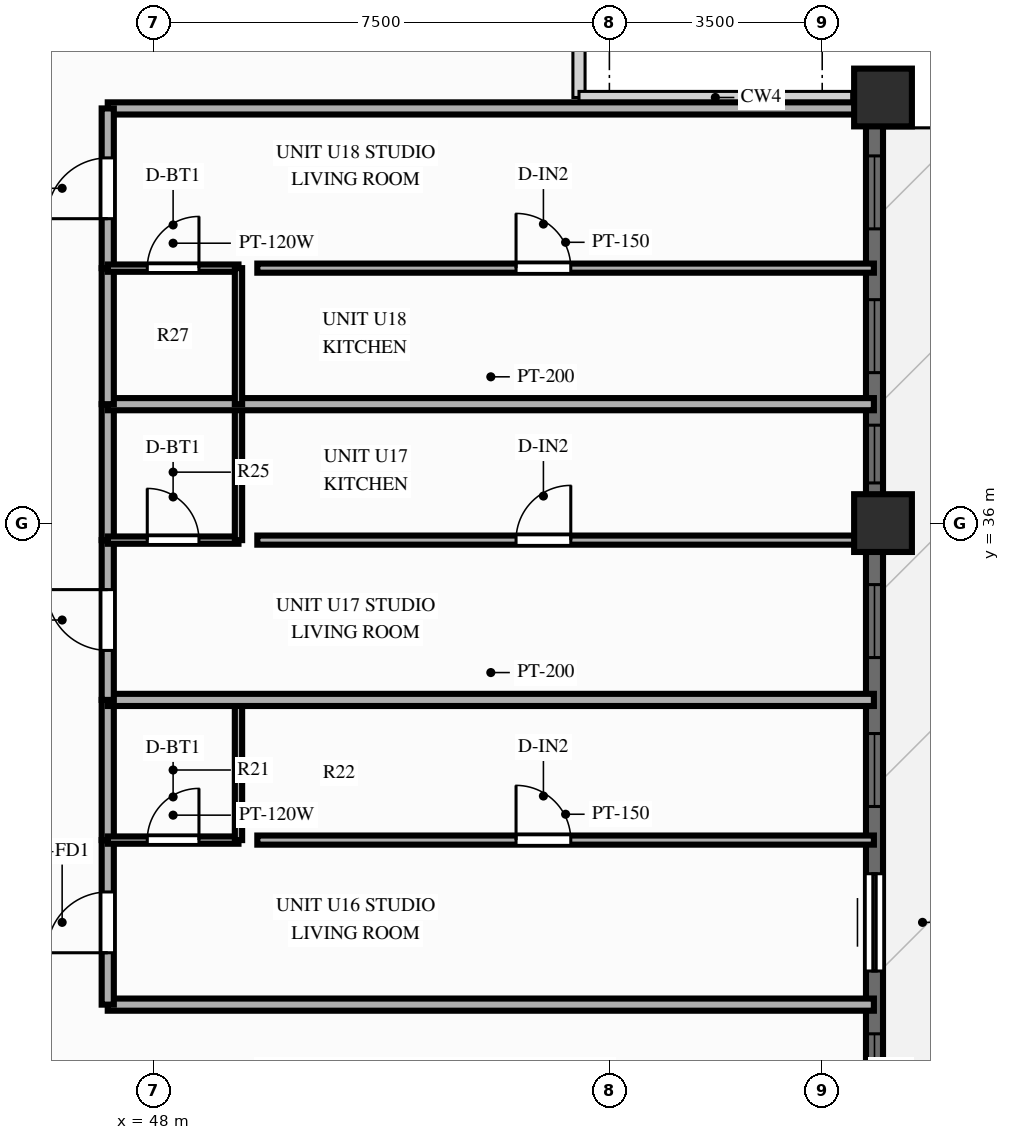
"""IFC4 building model, lengths in metres.
Left out: names, types, materials, properties, quantities, classifications, styles, units other than length and angle.
Written with IfcOpenShell. Run it as: python <this file> out.ifc"""

import sys

from ifc_helpers import new_model, si_unit, direction, frame, frame_2d, origin, origin_2d, place, context, subcontext, project, spatial, rectangle, extrude, source, transform, mapped, element, fill, save


model = new_model("IFC4")
c1 = context("Model", 3, precision=1e-05, world=origin(), true_north=direction((0.0, 1.0)))
c2 = subcontext(c1, "Body", "Model", "MODEL_VIEW")
j1 = project(units=[si_unit("LENGTHUNIT", "METRE"), si_unit("PLANEANGLEUNIT", "RADIAN")], contexts=[c1])
p1 = place(None, origin())
s1 = spatial("IfcSite", under=j1, at=p1, CompositionType="ELEMENT")
p2 = place(p1, origin())
s2 = spatial("IfcBuilding", under=s1, at=p2, CompositionType="ELEMENT")
p3 = place(p2, frame((0.0, 0.0, 166.0)))
s3 = spatial("IfcBuildingStorey", under=s2, at=p3, CompositionType="ELEMENT", Elevation=166.0)
m1 = source(origin(), c2, "Body", "SweptSolid", [
    extrude(rectangle(XDim=0.95, YDim=0.95, at=origin_2d()), origin(), (0.0, 0.0, 1.0), 3.0),
])
for number, where, z_axis, x_axis in (
    (1, (60.0, 36.0, 0.0), (0.0, 0.0, 1.0), (1.0, 0.0, 0.0)),
    (2, (60.0, 43.0, 0.0), (0.0, 0.0, 1.0), (1.0, 0.0, 0.0)),
):
    element("IfcColumn", number, at=place(p3, frame(where, z_axis=z_axis, x_axis=x_axis)), inside=s3, PredefinedType="COLUMN", context=c2, shape_type="MappedRepresentation", body=[
        mapped(m1, transform((0.0, 0.0, 0.0), scale=1.0)),
    ])
p4 = place(p3, frame((59.86, 11.0, 0.0), z_axis=(0.0, 0.0, 1.0), x_axis=(0.0, 1.0, 0.0)))
e3 = element("IfcWall", 3, at=p4, inside=s3, PredefinedType="SOLIDWALL", context=c2, shape_type="SweptSolid", body=[
    extrude(rectangle(XDim=32.0, YDim=0.28, at=frame_2d((16.0, 0.0))), origin(), (0.0, 0.0, 1.0), 2.28),
])
p5 = place(p4, frame((1.04, 0.0, 0.25)))
e4 = element("IfcOpeningElement", 4, at=p5, cuts=e3, PredefinedType="OPENING", context=c2, shape_type="SweptSolid", body=[
    extrude(rectangle(XDim=1.2, YDim=1.5, at=frame_2d((0.6, 0.75))), frame((0.0, 0.152, 0.0), z_axis=(0.0, -1.0, 0.0), x_axis=(1.0, 0.0, 0.0)), (0.0, 0.0, 1.0), 0.304),
])
p6 = place(p4, frame((3.552, 0.0, 0.25)))
e5 = element("IfcOpeningElement", 5, at=p6, cuts=e3, PredefinedType="OPENING", context=c2, shape_type="SweptSolid", body=[
    extrude(rectangle(XDim=1.2, YDim=1.5, at=frame_2d((0.6, 0.75))), frame((0.0, 0.152, 0.0), z_axis=(0.0, -1.0, 0.0), x_axis=(1.0, 0.0, 0.0)), (0.0, 0.0, 1.0), 0.304),
])
p7 = place(p4, frame((5.662, 0.0, 0.25)))
e6 = element("IfcOpeningElement", 6, at=p7, cuts=e3, PredefinedType="OPENING", context=c2, shape_type="SweptSolid", body=[
    extrude(rectangle(XDim=0.7, YDim=1.5, at=frame_2d((0.35, 0.75))), frame((0.0, 0.152, 0.0), z_axis=(0.0, -1.0, 0.0), x_axis=(1.0, 0.0, 0.0)), (0.0, 0.0, 1.0), 0.304),
])
p8 = place(p4, frame((8.29, 0.0, 0.25)))
e7 = element("IfcOpeningElement", 7, at=p8, cuts=e3, PredefinedType="OPENING", context=c2, shape_type="SweptSolid", body=[
    extrude(rectangle(XDim=1.2, YDim=1.5, at=frame_2d((0.6, 0.75))), frame((0.0, 0.152, 0.0), z_axis=(0.0, -1.0, 0.0), x_axis=(1.0, 0.0, 0.0)), (0.0, 0.0, 1.0), 0.304),
])
p9 = place(p4, frame((10.688, 0.0, 0.25)))
e8 = element("IfcOpeningElement", 8, at=p9, cuts=e3, PredefinedType="OPENING", context=c2, shape_type="SweptSolid", body=[
    extrude(rectangle(XDim=1.2, YDim=1.5, at=frame_2d((0.6, 0.75))), frame((0.0, 0.152, 0.0), z_axis=(0.0, -1.0, 0.0), x_axis=(1.0, 0.0, 0.0)), (0.0, 0.0, 1.0), 0.304),
])
p10 = place(p4, frame((13.046, 0.0, 0.25)))
e9 = element("IfcOpeningElement", 9, at=p10, cuts=e3, PredefinedType="OPENING", context=c2, shape_type="SweptSolid", body=[
    extrude(rectangle(XDim=1.2, YDim=1.5, at=frame_2d((0.6, 0.75))), frame((0.0, 0.152, 0.0), z_axis=(0.0, -1.0, 0.0), x_axis=(1.0, 0.0, 0.0)), (0.0, 0.0, 1.0), 0.304),
])
p11 = place(p4, frame((15.4, 0.0, 0.25)))
e10 = element("IfcOpeningElement", 10, at=p11, cuts=e3, PredefinedType="OPENING", context=c2, shape_type="SweptSolid", body=[
    extrude(rectangle(XDim=1.2, YDim=1.5, at=frame_2d((0.6, 0.75))), frame((0.0, 0.152, 0.0), z_axis=(0.0, -1.0, 0.0), x_axis=(1.0, 0.0, 0.0)), (0.0, 0.0, 1.0), 0.304),
])
p12 = place(p4, frame((19.233, 0.0, 0.0), z_axis=(0.0, 0.0, 1.0), x_axis=(-1.0, 0.0, 0.0)))
e11 = element("IfcOpeningElement", 11, at=p12, cuts=e3, PredefinedType="OPENING", context=c2, shape_type="SweptSolid", body=[
    extrude(rectangle(XDim=1.6, YDim=2.15, at=frame_2d((0.8, 1.075))), frame((0.0, 0.152, 0.0), z_axis=(0.0, -1.0, 0.0), x_axis=(1.0, 0.0, 0.0)), (0.0, 0.0, 1.0), 0.304),
])
p13 = place(p4, frame((20.339, 0.0, 0.25)))
e12 = element("IfcOpeningElement", 12, at=p13, cuts=e3, PredefinedType="OPENING", context=c2, shape_type="SweptSolid", body=[
    extrude(rectangle(XDim=1.2, YDim=1.5, at=frame_2d((0.6, 0.75))), frame((0.0, 0.152, 0.0), z_axis=(0.0, -1.0, 0.0), x_axis=(1.0, 0.0, 0.0)), (0.0, 0.0, 1.0), 0.304),
])
p14 = place(p4, frame((22.788, 0.0, 0.25)))
e13 = element("IfcOpeningElement", 13, at=p14, cuts=e3, PredefinedType="OPENING", context=c2, shape_type="SweptSolid", body=[
    extrude(rectangle(XDim=1.2, YDim=1.5, at=frame_2d((0.6, 0.75))), frame((0.0, 0.152, 0.0), z_axis=(0.0, -1.0, 0.0), x_axis=(1.0, 0.0, 0.0)), (0.0, 0.0, 1.0), 0.304),
])
p15 = place(p4, frame((25.66, 0.0, 0.25)))
e14 = element("IfcOpeningElement", 14, at=p15, cuts=e3, PredefinedType="OPENING", context=c2, shape_type="SweptSolid", body=[
    extrude(rectangle(XDim=0.95, YDim=1.5, at=frame_2d((0.475, 0.75))), frame((0.0, 0.152, 0.0), z_axis=(0.0, -1.0, 0.0), x_axis=(1.0, 0.0, 0.0)), (0.0, 0.0, 1.0), 0.304),
])
p16 = place(p4, frame((27.475, 0.0, 0.25)))
e15 = element("IfcOpeningElement", 15, at=p16, cuts=e3, PredefinedType="OPENING", context=c2, shape_type="SweptSolid", body=[
    extrude(rectangle(XDim=1.2, YDim=1.5, at=frame_2d((0.6, 0.75))), frame((0.0, 0.152, 0.0), z_axis=(0.0, -1.0, 0.0), x_axis=(1.0, 0.0, 0.0)), (0.0, 0.0, 1.0), 0.304),
])
p17 = place(p4, frame((29.839, 0.0, 0.25)))
e16 = element("IfcOpeningElement", 16, at=p17, cuts=e3, PredefinedType="OPENING", context=c2, shape_type="SweptSolid", body=[
    extrude(rectangle(XDim=1.2, YDim=1.5, at=frame_2d((0.6, 0.75))), frame((0.0, 0.152, 0.0), z_axis=(0.0, -1.0, 0.0), x_axis=(1.0, 0.0, 0.0)), (0.0, 0.0, 1.0), 0.304),
])
for number, where, z_axis, x_axis in (
    (17, (47.25, 28.08, 0.0), (0.0, 0.0, 1.0), (1.0, 0.0, 0.0)),
    (18, (47.25, 42.82, 0.0), (0.0, 0.0, 1.0), (1.0, 0.0, 0.0)),
):
    element("IfcWall", number, at=place(p3, frame(where, z_axis=z_axis, x_axis=x_axis)), inside=s3, PredefinedType="PARTITIONING", context=c2, shape_type="SweptSolid", body=[
        extrude(rectangle(XDim=12.6, YDim=0.2, at=frame_2d((6.3, 0.0))), origin(), (0.0, 0.0, 1.0), 2.79),
    ])
p18 = place(p3, frame((47.25, 28.08, 0.0), z_axis=(0.0, 0.0, 1.0), x_axis=(0.0, 1.0, 0.0)))
e19 = element("IfcWall", 19, at=p18, inside=s3, PredefinedType="PARTITIONING", context=c2, shape_type="SweptSolid", body=[
    extrude(rectangle(XDim=2.706, YDim=0.2, at=frame_2d((1.353, 0.0))), origin(), (0.0, 0.0, 1.0), 2.79),
])
p19 = place(p18, frame((0.853, 0.0, 0.0)))
e20 = element("IfcOpeningElement", 20, at=p19, cuts=e19, PredefinedType="OPENING", context=c2, shape_type="SweptSolid", body=[
    extrude(rectangle(XDim=1.0, YDim=2.15, at=frame_2d((0.5, 1.075))), frame((0.0, 0.112, 0.0), z_axis=(0.0, -1.0, 0.0), x_axis=(1.0, 0.0, 0.0)), (0.0, 0.0, 1.0), 0.224),
])
p20 = place(p3, frame((47.25, 30.786, 0.0), z_axis=(0.0, 0.0, 1.0), x_axis=(0.0, 1.0, 0.0)))
e21 = element("IfcWall", 21, at=p20, inside=s3, PredefinedType="PARTITIONING", context=c2, shape_type="SweptSolid", body=[
    extrude(rectangle(XDim=2.305, YDim=0.2, at=frame_2d((1.153, 0.0))), origin(), (0.0, 0.0, 1.0), 2.79),
])
p21 = place(p3, frame((47.25, 30.786, 0.0), z_axis=(0.0, 0.0, 1.0), x_axis=(1.0, 0.0, 0.0)))
e22 = element("IfcWall", 22, at=p21, inside=s3, PredefinedType="PARTITIONING", context=c2, shape_type="SweptSolid", body=[
    extrude(rectangle(XDim=2.15, YDim=0.12, at=frame_2d((1.075, 0.0))), origin(), (0.0, 0.0, 1.0), 2.79),
])
p22 = place(p21, frame((0.65, 0.0, 0.0)))
e23 = element("IfcOpeningElement", 23, at=p22, cuts=e22, PredefinedType="OPENING", context=c2, shape_type="SweptSolid", body=[
    extrude(rectangle(XDim=0.85, YDim=2.05, at=frame_2d((0.425, 1.025))), frame((0.0, 0.072, 0.0), z_axis=(0.0, -1.0, 0.0), x_axis=(1.0, 0.0, 0.0)), (0.0, 0.0, 1.0), 0.144),
])
p23 = place(p3, frame((49.4, 30.786, 0.0), z_axis=(0.0, 0.0, 1.0), x_axis=(0.0, 1.0, 0.0)))
e24 = element("IfcWall", 24, at=p23, inside=s3, PredefinedType="PARTITIONING", context=c2, shape_type="SweptSolid", body=[
    extrude(rectangle(XDim=2.305, YDim=0.12, at=frame_2d((1.153, 0.0))), origin(), (0.0, 0.0, 1.0), 2.79),
])
p24 = place(p3, frame((49.71, 30.786, 0.0), z_axis=(0.0, 0.0, 1.0), x_axis=(1.0, 0.0, 0.0)))
e25 = element("IfcWall", 25, at=p24, inside=s3, PredefinedType="PARTITIONING", context=c2, shape_type="SweptSolid", body=[
    extrude(rectangle(XDim=10.14, YDim=0.15, at=frame_2d((5.07, 0.0))), origin(), (0.0, 0.0, 1.0), 2.79),
])
p25 = place(p24, frame((4.255, 0.0, 0.0)))
e26 = element("IfcOpeningElement", 26, at=p25, cuts=e25, PredefinedType="OPENING", context=c2, shape_type="SweptSolid", body=[
    extrude(rectangle(XDim=0.9, YDim=2.1, at=frame_2d((0.45, 1.05))), frame((0.0, 0.087, 0.0), z_axis=(0.0, -1.0, 0.0), x_axis=(1.0, 0.0, 0.0)), (0.0, 0.0, 1.0), 0.174),
])
p26 = place(p3, frame((47.25, 33.092, 0.0), z_axis=(0.0, 0.0, 1.0), x_axis=(1.0, 0.0, 0.0)))
e27 = element("IfcWall", 27, at=p26, inside=s3, PredefinedType="PARTITIONING", context=c2, shape_type="SweptSolid", body=[
    extrude(rectangle(XDim=12.6, YDim=0.2, at=frame_2d((6.3, 0.0))), origin(), (0.0, 0.0, 1.0), 2.79),
])
p27 = place(p3, frame((47.25, 33.092, 0.0), z_axis=(0.0, 0.0, 1.0), x_axis=(0.0, 1.0, 0.0)))
e28 = element("IfcWall", 28, at=p27, inside=s3, PredefinedType="PARTITIONING", context=c2, shape_type="SweptSolid", body=[
    extrude(rectangle(XDim=2.628, YDim=0.2, at=frame_2d((1.314, 0.0))), origin(), (0.0, 0.0, 1.0), 2.79),
])
p28 = place(p27, frame((0.814, 0.0, 0.0)))
e29 = element("IfcOpeningElement", 29, at=p28, cuts=e28, PredefinedType="OPENING", context=c2, shape_type="SweptSolid", body=[
    extrude(rectangle(XDim=1.0, YDim=2.15, at=frame_2d((0.5, 1.075))), frame((0.0, 0.112, 0.0), z_axis=(0.0, -1.0, 0.0), x_axis=(1.0, 0.0, 0.0)), (0.0, 0.0, 1.0), 0.224),
])
p29 = place(p3, frame((47.25, 35.72, 0.0), z_axis=(0.0, 0.0, 1.0), x_axis=(0.0, 1.0, 0.0)))
e30 = element("IfcWall", 30, at=p29, inside=s3, PredefinedType="PARTITIONING", context=c2, shape_type="SweptSolid", body=[
    extrude(rectangle(XDim=2.236, YDim=0.2, at=frame_2d((1.118, 0.0))), origin(), (0.0, 0.0, 1.0), 2.79),
])
p30 = place(p3, frame((47.25, 35.72, 0.0), z_axis=(0.0, 0.0, 1.0), x_axis=(1.0, 0.0, 0.0)))
e31 = element("IfcWall", 31, at=p30, inside=s3, PredefinedType="PARTITIONING", context=c2, shape_type="SweptSolid", body=[
    extrude(rectangle(XDim=2.15, YDim=0.12, at=frame_2d((1.075, 0.0))), origin(), (0.0, 0.0, 1.0), 2.79),
])
p31 = place(p30, frame((0.65, 0.0, 0.0)))
e32 = element("IfcOpeningElement", 32, at=p31, cuts=e31, PredefinedType="OPENING", context=c2, shape_type="SweptSolid", body=[
    extrude(rectangle(XDim=0.85, YDim=2.05, at=frame_2d((0.425, 1.025))), frame((0.0, 0.072, 0.0), z_axis=(0.0, -1.0, 0.0), x_axis=(1.0, 0.0, 0.0)), (0.0, 0.0, 1.0), 0.144),
])
p32 = place(p3, frame((49.4, 35.72, 0.0), z_axis=(0.0, 0.0, 1.0), x_axis=(0.0, 1.0, 0.0)))
e33 = element("IfcWall", 33, at=p32, inside=s3, PredefinedType="PARTITIONING", context=c2, shape_type="SweptSolid", body=[
    extrude(rectangle(XDim=2.236, YDim=0.12, at=frame_2d((1.118, 0.0))), origin(), (0.0, 0.0, 1.0), 2.79),
])
p33 = place(p3, frame((49.71, 35.72, 0.0), z_axis=(0.0, 0.0, 1.0), x_axis=(1.0, 0.0, 0.0)))
e34 = element("IfcWall", 34, at=p33, inside=s3, PredefinedType="PARTITIONING", context=c2, shape_type="SweptSolid", body=[
    extrude(rectangle(XDim=10.14, YDim=0.15, at=frame_2d((5.07, 0.0))), origin(), (0.0, 0.0, 1.0), 2.79),
])
p34 = place(p33, frame((4.255, 0.0, 0.0)))
e35 = element("IfcOpeningElement", 35, at=p34, cuts=e34, PredefinedType="OPENING", context=c2, shape_type="SweptSolid", body=[
    extrude(rectangle(XDim=0.9, YDim=2.1, at=frame_2d((0.45, 1.05))), frame((0.0, 0.087, 0.0), z_axis=(0.0, -1.0, 0.0), x_axis=(1.0, 0.0, 0.0)), (0.0, 0.0, 1.0), 0.174),
])
p35 = place(p3, frame((47.25, 37.956, 0.0), z_axis=(0.0, 0.0, 1.0), x_axis=(1.0, 0.0, 0.0)))
e36 = element("IfcWall", 36, at=p35, inside=s3, PredefinedType="PARTITIONING", context=c2, shape_type="SweptSolid", body=[
    extrude(rectangle(XDim=12.6, YDim=0.2, at=frame_2d((6.3, 0.0))), origin(), (0.0, 0.0, 1.0), 2.79),
])
p36 = place(p3, frame((47.25, 37.956, 0.0), z_axis=(0.0, 0.0, 1.0), x_axis=(0.0, 1.0, 0.0)))
e37 = element("IfcWall", 37, at=p36, inside=s3, PredefinedType="PARTITIONING", context=c2, shape_type="SweptSolid", body=[
    extrude(rectangle(XDim=2.238, YDim=0.2, at=frame_2d((1.119, 0.0))), origin(), (0.0, 0.0, 1.0), 2.79),
])
p37 = place(p3, frame((47.25, 40.193, 0.0), z_axis=(0.0, 0.0, 1.0), x_axis=(0.0, 1.0, 0.0)))
e38 = element("IfcWall", 38, at=p37, inside=s3, PredefinedType="PARTITIONING", context=c2, shape_type="SweptSolid", body=[
    extrude(rectangle(XDim=2.627, YDim=0.2, at=frame_2d((1.313, 0.0))), origin(), (0.0, 0.0, 1.0), 2.79),
])
p38 = place(p37, frame((0.813, 0.0, 0.0)))
e39 = element("IfcOpeningElement", 39, at=p38, cuts=e38, PredefinedType="OPENING", context=c2, shape_type="SweptSolid", body=[
    extrude(rectangle(XDim=1.0, YDim=2.15, at=frame_2d((0.5, 1.075))), frame((0.0, 0.112, 0.0), z_axis=(0.0, -1.0, 0.0), x_axis=(1.0, 0.0, 0.0)), (0.0, 0.0, 1.0), 0.224),
])
p39 = place(p3, frame((47.25, 40.193, 0.0), z_axis=(0.0, 0.0, 1.0), x_axis=(1.0, 0.0, 0.0)))
e40 = element("IfcWall", 40, at=p39, inside=s3, PredefinedType="PARTITIONING", context=c2, shape_type="SweptSolid", body=[
    extrude(rectangle(XDim=2.15, YDim=0.12, at=frame_2d((1.075, 0.0))), origin(), (0.0, 0.0, 1.0), 2.79),
])
p40 = place(p39, frame((0.65, 0.0, 0.0)))
e41 = element("IfcOpeningElement", 41, at=p40, cuts=e40, PredefinedType="OPENING", context=c2, shape_type="SweptSolid", body=[
    extrude(rectangle(XDim=0.85, YDim=2.05, at=frame_2d((0.425, 1.025))), frame((0.0, 0.072, 0.0), z_axis=(0.0, -1.0, 0.0), x_axis=(1.0, 0.0, 0.0)), (0.0, 0.0, 1.0), 0.144),
])
p41 = place(p3, frame((49.4, 37.956, 0.0), z_axis=(0.0, 0.0, 1.0), x_axis=(0.0, 1.0, 0.0)))
e42 = element("IfcWall", 42, at=p41, inside=s3, PredefinedType="PARTITIONING", context=c2, shape_type="SweptSolid", body=[
    extrude(rectangle(XDim=2.238, YDim=0.12, at=frame_2d((1.119, 0.0))), origin(), (0.0, 0.0, 1.0), 2.79),
])
p42 = place(p3, frame((49.71, 40.193, 0.0), z_axis=(0.0, 0.0, 1.0), x_axis=(1.0, 0.0, 0.0)))
e43 = element("IfcWall", 43, at=p42, inside=s3, PredefinedType="PARTITIONING", context=c2, shape_type="SweptSolid", body=[
    extrude(rectangle(XDim=10.14, YDim=0.15, at=frame_2d((5.07, 0.0))), origin(), (0.0, 0.0, 1.0), 2.79),
])
p43 = place(p42, frame((4.255, 0.0, 0.0)))
e44 = element("IfcOpeningElement", 44, at=p43, cuts=e43, PredefinedType="OPENING", context=c2, shape_type="SweptSolid", body=[
    extrude(rectangle(XDim=0.9, YDim=2.1, at=frame_2d((0.45, 1.05))), frame((0.0, 0.087, 0.0), z_axis=(0.0, -1.0, 0.0), x_axis=(1.0, 0.0, 0.0)), (0.0, 0.0, 1.0), 0.174),
])
m2 = source(origin(), c2, "Body", "SweptSolid", [
    extrude(rectangle(XDim=1.2, YDim=1.5, at=frame_2d((0.6, 0.75))), frame((0.0, 0.03, 0.0), z_axis=(0.0, -1.0, 0.0), x_axis=(1.0, 0.0, 0.0)), (0.0, 0.0, 1.0), 0.06),
])
p44 = place(p11, origin())
e45 = element("IfcWindow", 45, at=p44, inside=s3, PartitioningType="SINGLE_PANEL", PredefinedType="WINDOW", context=c2, shape_type="MappedRepresentation", body=[
    mapped(m2, transform((0.0, 0.0, 0.0), scale=1.0)),
])
fill(e10, e45)
m3 = source(origin(), c2, "Body", "SweptSolid", [
    extrude(rectangle(XDim=1.6, YDim=2.15, at=frame_2d((0.8, 1.075))), frame((0.0, 0.025, 0.0), z_axis=(0.0, -1.0, 0.0), x_axis=(1.0, 0.0, 0.0)), (0.0, 0.0, 1.0), 0.05),
])
p45 = place(p12, origin())
e46 = element("IfcDoor", 46, at=p45, inside=s3, OperationType="SLIDING_TO_LEFT", PredefinedType="DOOR", context=c2, shape_type="MappedRepresentation", body=[
    mapped(m3, transform((0.0, 0.0, 0.0), scale=1.0)),
])
fill(e11, e46)
p46 = place(p13, origin())
e47 = element("IfcWindow", 47, at=p46, inside=s3, PartitioningType="SINGLE_PANEL", PredefinedType="WINDOW", context=c2, shape_type="MappedRepresentation", body=[
    mapped(m2, transform((0.0, 0.0, 0.0), scale=1.0)),
])
fill(e12, e47)
p47 = place(p14, origin())
e48 = element("IfcWindow", 48, at=p47, inside=s3, PartitioningType="SINGLE_PANEL", PredefinedType="WINDOW", context=c2, shape_type="MappedRepresentation", body=[
    mapped(m2, transform((0.0, 0.0, 0.0), scale=1.0)),
])
fill(e13, e48)
m4 = source(origin(), c2, "Body", "SweptSolid", [
    extrude(rectangle(XDim=0.95, YDim=1.5, at=frame_2d((0.475, 0.75))), frame((0.0, 0.03, 0.0), z_axis=(0.0, -1.0, 0.0), x_axis=(1.0, 0.0, 0.0)), (0.0, 0.0, 1.0), 0.06),
])
p48 = place(p15, origin())
e49 = element("IfcWindow", 49, at=p48, inside=s3, PartitioningType="SINGLE_PANEL", PredefinedType="WINDOW", context=c2, shape_type="MappedRepresentation", body=[
    mapped(m4, transform((0.0, 0.0, 0.0), scale=1.0)),
])
fill(e14, e49)
p49 = place(p16, origin())
e50 = element("IfcWindow", 50, at=p49, inside=s3, PartitioningType="SINGLE_PANEL", PredefinedType="WINDOW", context=c2, shape_type="MappedRepresentation", body=[
    mapped(m2, transform((0.0, 0.0, 0.0), scale=1.0)),
])
fill(e15, e50)
p50 = place(p17, origin())
e51 = element("IfcWindow", 51, at=p50, inside=s3, PartitioningType="SINGLE_PANEL", PredefinedType="WINDOW", context=c2, shape_type="MappedRepresentation", body=[
    mapped(m2, transform((0.0, 0.0, 0.0), scale=1.0)),
])
fill(e16, e51)
m5 = source(origin(), c2, "Body", "SweptSolid", [
    extrude(rectangle(XDim=1.0, YDim=2.15, at=frame_2d((0.5, 1.075))), frame((0.0, 0.025, 0.0), z_axis=(0.0, -1.0, 0.0), x_axis=(1.0, 0.0, 0.0)), (0.0, 0.0, 1.0), 0.05),
])
p51 = place(p19, origin())
e52 = element("IfcDoor", 52, at=p51, inside=s3, OperationType="SINGLE_SWING_LEFT", PredefinedType="DOOR", context=c2, shape_type="MappedRepresentation", body=[
    mapped(m5, transform((0.0, 0.0, 0.0), scale=1.0)),
])
fill(e20, e52)
m6 = source(origin(), c2, "Body", "SweptSolid", [
    extrude(rectangle(XDim=0.85, YDim=2.05, at=frame_2d((0.425, 1.025))), frame((0.0, 0.025, 0.0), z_axis=(0.0, -1.0, 0.0), x_axis=(1.0, 0.0, 0.0)), (0.0, 0.0, 1.0), 0.05),
])
p52 = place(p22, origin())
e53 = element("IfcDoor", 53, at=p52, inside=s3, OperationType="SINGLE_SWING_RIGHT", PredefinedType="DOOR", context=c2, shape_type="MappedRepresentation", body=[
    mapped(m6, transform((0.0, 0.0, 0.0), scale=1.0)),
])
fill(e23, e53)
m7 = source(origin(), c2, "Body", "SweptSolid", [
    extrude(rectangle(XDim=0.9, YDim=2.1, at=frame_2d((0.45, 1.05))), frame((0.0, 0.025, 0.0), z_axis=(0.0, -1.0, 0.0), x_axis=(1.0, 0.0, 0.0)), (0.0, 0.0, 1.0), 0.05),
])
p53 = place(p25, origin())
e54 = element("IfcDoor", 54, at=p53, inside=s3, OperationType="SINGLE_SWING_LEFT", PredefinedType="DOOR", context=c2, shape_type="MappedRepresentation", body=[
    mapped(m7, transform((0.0, 0.0, 0.0), scale=1.0)),
])
fill(e26, e54)
p54 = place(p28, origin())
e55 = element("IfcDoor", 55, at=p54, inside=s3, OperationType="SINGLE_SWING_RIGHT", PredefinedType="DOOR", context=c2, shape_type="MappedRepresentation", body=[
    mapped(m5, transform((0.0, 0.0, 0.0), scale=1.0)),
])
fill(e29, e55)
p55 = place(p31, origin())
e56 = element("IfcDoor", 56, at=p55, inside=s3, OperationType="SINGLE_SWING_LEFT", PredefinedType="DOOR", context=c2, shape_type="MappedRepresentation", body=[
    mapped(m6, transform((0.0, 0.0, 0.0), scale=1.0)),
])
fill(e32, e56)
p56 = place(p34, origin())
e57 = element("IfcDoor", 57, at=p56, inside=s3, OperationType="SINGLE_SWING_RIGHT", PredefinedType="DOOR", context=c2, shape_type="MappedRepresentation", body=[
    mapped(m7, transform((0.0, 0.0, 0.0), scale=1.0)),
])
fill(e35, e57)
p57 = place(p38, origin())
e58 = element("IfcDoor", 58, at=p57, inside=s3, OperationType="SINGLE_SWING_LEFT", PredefinedType="DOOR", context=c2, shape_type="MappedRepresentation", body=[
    mapped(m5, transform((0.0, 0.0, 0.0), scale=1.0)),
])
fill(e39, e58)
p58 = place(p40, origin())
e59 = element("IfcDoor", 59, at=p58, inside=s3, OperationType="SINGLE_SWING_RIGHT", PredefinedType="DOOR", context=c2, shape_type="MappedRepresentation", body=[
    mapped(m6, transform((0.0, 0.0, 0.0), scale=1.0)),
])
fill(e41, e59)
p59 = place(p43, origin())
e60 = element("IfcDoor", 60, at=p59, inside=s3, OperationType="SINGLE_SWING_LEFT", PredefinedType="DOOR", context=c2, shape_type="MappedRepresentation", body=[
    mapped(m7, transform((0.0, 0.0, 0.0), scale=1.0)),
])
fill(e44, e60)
save(model, sys.argv[1])
